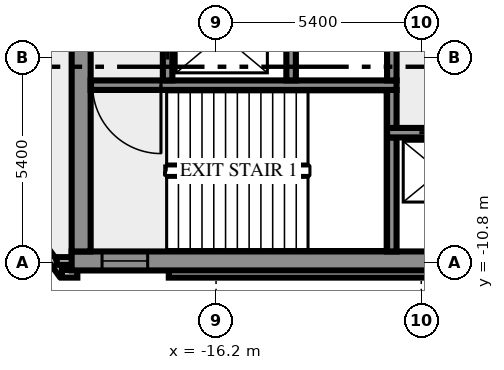
"""IFC4 building model, lengths in metres.
Left out: names, types, materials, properties, quantities, classifications, styles, units other than length and angle.
Written with IfcOpenShell. Run it as: python <this file> out.ifc"""

import sys

from ifc_helpers import new_model, si_unit, direction, frame, frame_2d, origin, place, context, subcontext, project, spatial, rectangle, extrude, element, fill, save


model = new_model("IFC4")
c1 = context("Model", 3, precision=1e-05, world=origin(), true_north=direction((0.0, 1.0)))
c2 = subcontext(c1, "Body", "Model", "MODEL_VIEW")
j1 = project(units=[si_unit("LENGTHUNIT", "METRE"), si_unit("PLANEANGLEUNIT", "RADIAN")], contexts=[c1])
p1 = place(None, origin())
s1 = spatial("IfcSite", under=j1, at=p1, CompositionType="ELEMENT")
p2 = place(p1, origin())
s2 = spatial("IfcBuilding", under=s1, at=p2, CompositionType="ELEMENT")
p3 = place(p2, frame((0.0, 0.0, 121.0)))
s3 = spatial("IfcBuildingStorey", under=s2, at=p3, CompositionType="ELEMENT", Elevation=121.0)
p4 = place(p3, frame((-21.833, -8.909, 0.0), z_axis=(0.0, 0.0, 1.0), x_axis=(0.587766567315, -0.809030569476, 0.0)))
e1 = element("IfcWall", 1, at=p4, inside=s3, PredefinedType="SOLIDWALL", context=c2, shape_type="SweptSolid", body=[
    extrude(rectangle(XDim=2.688, YDim=0.2, at=frame_2d((1.344, 0.0))), origin(), (0.0, 0.0, 1.0), 3.65),
])
p5 = place(p3, frame((-20.256, -11.088, 0.0), z_axis=(0.0, 0.0, 1.0), x_axis=(1.0, 0.0, 0.0)))
e2 = element("IfcWall", 2, at=p5, inside=s3, PredefinedType="SOLIDWALL", context=c2, shape_type="SweptSolid", body=[
    extrude(rectangle(XDim=0.406, YDim=0.2, at=frame_2d((0.203, 0.0))), origin(), (0.0, 0.0, 1.0), 3.65),
])
p6 = place(p3, frame((-17.444, -11.088, 0.0), z_axis=(0.0, 0.0, 1.0), x_axis=(1.0, 0.0, 0.0)))
e3 = element("IfcWall", 3, at=p6, inside=s3, PredefinedType="SOLIDWALL", context=c2, shape_type="SweptSolid", body=[
    extrude(rectangle(XDim=34.888, YDim=0.2, at=frame_2d((17.444, 0.0))), origin(), (0.0, 0.0, 1.0), 3.65),
])
p7 = place(p3, frame((-19.98, -10.75, 0.0), z_axis=(0.0, 0.0, 1.0), x_axis=(-1.0, 0.0, 0.0)))
e4 = element("IfcWall", 4, at=p7, inside=s3, PredefinedType="SOLIDWALL", context=c2, shape_type="SweptSolid", body=[
    extrude(rectangle(XDim=0.417, YDim=0.2, at=frame_2d((0.208, 0.0))), origin(), (0.0, 0.0, 1.0), 3.65),
])
p8 = place(p3, frame((-20.0, -10.75, 0.0), z_axis=(0.0, 0.0, 1.0), x_axis=(1.0, 0.0, 0.0)))
e5 = element("IfcWall", 5, at=p8, inside=s3, PredefinedType="SHEAR", context=c2, shape_type="SweptSolid", body=[
    extrude(rectangle(XDim=40.0, YDim=0.5, at=frame_2d((20.0, 0.0))), origin(), (0.0, 0.0, 1.0), 3.65),
])
p9 = place(p8, frame((0.8, 0.0, 1.0)))
e6 = element("IfcOpeningElement", 6, at=p9, cuts=e5, PredefinedType="OPENING", context=c2, shape_type="SweptSolid", body=[
    extrude(rectangle(XDim=1.2, YDim=1.2, at=frame_2d((0.6, 0.6))), frame((0.0, 0.26, 0.0), z_axis=(0.0, -1.0, 0.0), x_axis=(1.0, 0.0, 0.0)), (0.0, 0.0, 1.0), 0.52),
])
p10 = place(p8, frame((38.0, 0.0, 1.0)))
e7 = element("IfcOpeningElement", 7, at=p10, cuts=e5, PredefinedType="OPENING", context=c2, shape_type="SweptSolid", body=[
    extrude(rectangle(XDim=1.2, YDim=1.2, at=frame_2d((0.6, 0.6))), frame((0.0, 0.26, 0.0), z_axis=(0.0, -1.0, 0.0), x_axis=(1.0, 0.0, 0.0)), (0.0, 0.0, 1.0), 0.52),
])
p11 = place(p3, frame((-19.75, -10.5, 0.0), z_axis=(0.0, 0.0, 1.0), x_axis=(0.0, 1.0, 0.0)))
e8 = element("IfcWall", 8, at=p11, inside=s3, PredefinedType="SHEAR", context=c2, shape_type="SweptSolid", body=[
    extrude(rectangle(XDim=8.8, YDim=0.5, at=frame_2d((4.4, 0.0))), origin(), (0.0, 0.0, 1.0), 3.65),
])
p12 = place(p3, frame((-11.575, -10.5, 0.0), z_axis=(0.0, 0.0, 1.0), x_axis=(0.0, 1.0, 0.0)))
e9 = element("IfcWall", 9, at=p12, inside=s3, PredefinedType="SHEAR", context=c2, shape_type="SweptSolid", body=[
    extrude(rectangle(XDim=3.0, YDim=0.25, at=frame_2d((1.5, 0.0))), origin(), (0.0, 0.0, 1.0), 3.65),
])
p13 = place(p3, frame((11.7, -7.375, 0.0), z_axis=(0.0, 0.0, 1.0), x_axis=(-1.0, 0.0, 0.0)))
e10 = element("IfcWall", 10, at=p13, inside=s3, PredefinedType="SHEAR", context=c2, shape_type="SweptSolid", body=[
    extrude(rectangle(XDim=23.4, YDim=0.25, at=frame_2d((11.7, 0.0))), origin(), (0.0, 0.0, 1.0), 3.65),
])
p14 = place(p13, frame((21.45, 0.0, 0.0)))
e11 = element("IfcOpeningElement", 11, at=p14, cuts=e10, PredefinedType="OPENING", context=c2, shape_type="SweptSolid", body=[
    extrude(rectangle(XDim=1.1, YDim=2.1, at=frame_2d((0.55, 1.05))), frame((0.0, 0.135, 0.0), z_axis=(0.0, -1.0, 0.0), x_axis=(1.0, 0.0, 0.0)), (0.0, 0.0, 1.0), 0.27),
])
p15 = place(p13, frame((18.95, 0.0, 0.0)))
e12 = element("IfcOpeningElement", 12, at=p15, cuts=e10, PredefinedType="OPENING", context=c2, shape_type="SweptSolid", body=[
    extrude(rectangle(XDim=1.1, YDim=2.1, at=frame_2d((0.55, 1.05))), frame((0.0, 0.135, 0.0), z_axis=(0.0, -1.0, 0.0), x_axis=(1.0, 0.0, 0.0)), (0.0, 0.0, 1.0), 0.27),
])
p16 = place(p13, frame((16.45, 0.0, 0.0)))
e13 = element("IfcOpeningElement", 13, at=p16, cuts=e10, PredefinedType="OPENING", context=c2, shape_type="SweptSolid", body=[
    extrude(rectangle(XDim=1.1, YDim=2.1, at=frame_2d((0.55, 1.05))), frame((0.0, 0.135, 0.0), z_axis=(0.0, -1.0, 0.0), x_axis=(1.0, 0.0, 0.0)), (0.0, 0.0, 1.0), 0.27),
])
p17 = place(p13, frame((14.75, 0.0, 0.0)))
e14 = element("IfcOpeningElement", 14, at=p17, cuts=e10, PredefinedType="OPENING", context=c2, shape_type="SweptSolid", body=[
    extrude(rectangle(XDim=0.7, YDim=2.1, at=frame_2d((0.35, 1.05))), frame((0.0, 0.135, 0.0), z_axis=(0.0, -1.0, 0.0), x_axis=(1.0, 0.0, 0.0)), (0.0, 0.0, 1.0), 0.27),
])
p18 = place(p13, frame((13.35, 0.0, 0.0)))
e15 = element("IfcOpeningElement", 15, at=p18, cuts=e10, PredefinedType="OPENING", context=c2, shape_type="SweptSolid", body=[
    extrude(rectangle(XDim=0.9, YDim=2.1, at=frame_2d((0.45, 1.05))), frame((0.0, 0.135, 0.0), z_axis=(0.0, -1.0, 0.0), x_axis=(1.0, 0.0, 0.0)), (0.0, 0.0, 1.0), 0.27),
])
p19 = place(p13, frame((11.975, 0.0, 0.0)))
e16 = element("IfcOpeningElement", 16, at=p19, cuts=e10, PredefinedType="OPENING", context=c2, shape_type="SweptSolid", body=[
    extrude(rectangle(XDim=0.9, YDim=2.1, at=frame_2d((0.45, 1.05))), frame((0.0, 0.135, 0.0), z_axis=(0.0, -1.0, 0.0), x_axis=(1.0, 0.0, 0.0)), (0.0, 0.0, 1.0), 0.27),
])
p20 = place(p13, frame((10.5, 0.0, 0.0)))
e17 = element("IfcOpeningElement", 17, at=p20, cuts=e10, PredefinedType="OPENING", context=c2, shape_type="SweptSolid", body=[
    extrude(rectangle(XDim=0.9, YDim=2.1, at=frame_2d((0.45, 1.05))), frame((0.0, 0.135, 0.0), z_axis=(0.0, -1.0, 0.0), x_axis=(1.0, 0.0, 0.0)), (0.0, 0.0, 1.0), 0.27),
])
p21 = place(p3, frame((-11.575, -7.25, 0.0), z_axis=(0.0, 0.0, 1.0), x_axis=(0.0, 1.0, 0.0)))
e18 = element("IfcWall", 18, at=p21, inside=s3, PredefinedType="SHEAR", context=c2, shape_type="SweptSolid", body=[
    extrude(rectangle(XDim=1.0, YDim=0.25, at=frame_2d((0.5, 0.0))), origin(), (0.0, 0.0, 1.0), 3.65),
])
p22 = place(p3, frame((-11.45, -6.125, 0.0), z_axis=(0.0, 0.0, 1.0), x_axis=(-1.0, 0.0, 0.0)))
e19 = element("IfcWall", 19, at=p22, inside=s3, PredefinedType="SHEAR", context=c2, shape_type="SweptSolid", body=[
    extrude(rectangle(XDim=8.05, YDim=0.25, at=frame_2d((4.025, 0.0))), origin(), (0.0, 0.0, 1.0), 3.65),
])
p23 = place(p22, frame((6.2, 0.0, 0.0)))
e20 = element("IfcOpeningElement", 20, at=p23, cuts=e19, PredefinedType="OPENING", context=c2, shape_type="SweptSolid", body=[
    extrude(rectangle(XDim=1.8, YDim=2.1, at=frame_2d((0.9, 1.05))), frame((0.0, 0.135, 0.0), z_axis=(0.0, -1.0, 0.0), x_axis=(1.0, 0.0, 0.0)), (0.0, 0.0, 1.0), 0.27),
])
p24 = place(p3, frame((-17.475, -6.0, 0.0), z_axis=(0.0, 0.0, 1.0), x_axis=(0.0, 1.0, 0.0)))
e21 = element("IfcWall", 21, at=p24, inside=s3, PredefinedType="SHEAR", context=c2, shape_type="SweptSolid", body=[
    extrude(rectangle(XDim=4.3, YDim=0.25, at=frame_2d((2.15, 0.0))), origin(), (0.0, 0.0, 1.0), 3.65),
])
p25 = place(p24, frame((0.55, 0.0, 0.0)))
e22 = element("IfcOpeningElement", 22, at=p25, cuts=e21, PredefinedType="OPENING", context=c2, shape_type="SweptSolid", body=[
    extrude(rectangle(XDim=1.3, YDim=2.1, at=frame_2d((0.65, 1.05))), frame((0.0, 0.135, 0.0), z_axis=(0.0, -1.0, 0.0), x_axis=(1.0, 0.0, 0.0)), (0.0, 0.0, 1.0), 0.27),
])
for number, where, z_axis, x_axis in (
    (23, (-14.225, -6.0, 0.0), (0.0, 0.0, 1.0), (0.0, 1.0, 0.0)),
    (24, (-11.575, -6.0, 0.0), (0.0, 0.0, 1.0), (0.0, 1.0, 0.0)),
):
    element("IfcWall", number, at=place(p3, frame(where, z_axis=z_axis, x_axis=x_axis)), inside=s3, PredefinedType="SHEAR", context=c2, shape_type="SweptSolid", body=[
        extrude(rectangle(XDim=1.75, YDim=0.25, at=frame_2d((0.875, 0.0))), origin(), (0.0, 0.0, 1.0), 3.65),
    ])
p26 = place(p9, origin())
e25 = element("IfcWindow", 25, at=p26, inside=s3, PartitioningType="SINGLE_PANEL", PredefinedType="WINDOW", context=c2, shape_type="SweptSolid", body=[
    extrude(rectangle(XDim=1.2, YDim=1.2, at=frame_2d((0.6, 0.6))), frame((0.0, 0.03, 0.0), z_axis=(0.0, -1.0, 0.0), x_axis=(1.0, 0.0, 0.0)), (0.0, 0.0, 1.0), 0.06),
])
fill(e6, e25)
p27 = place(p14, origin())
e26 = element("IfcDoor", 26, at=p27, inside=s3, OperationType="DOUBLE_DOOR_SLIDING", PredefinedType="DOOR", context=c2, shape_type="SweptSolid", body=[
    extrude(rectangle(XDim=1.1, YDim=2.1, at=frame_2d((0.55, 1.05))), frame((0.0, 0.025, 0.0), z_axis=(0.0, -1.0, 0.0), x_axis=(1.0, 0.0, 0.0)), (0.0, 0.0, 1.0), 0.05),
])
fill(e11, e26)
p28 = place(p23, origin())
e27 = element("IfcDoor", 27, at=p28, inside=s3, OperationType="DOUBLE_DOOR_SINGLE_SWING", PredefinedType="DOOR", context=c2, shape_type="SweptSolid", body=[
    extrude(rectangle(XDim=1.8, YDim=2.1, at=frame_2d((0.9, 1.05))), frame((0.0, 0.025, 0.0), z_axis=(0.0, -1.0, 0.0), x_axis=(1.0, 0.0, 0.0)), (0.0, 0.0, 1.0), 0.05),
])
fill(e20, e27)
p29 = place(p25, origin())
e28 = element("IfcDoor", 28, at=p29, inside=s3, OperationType="DOUBLE_DOOR_SLIDING", PredefinedType="DOOR", context=c2, shape_type="SweptSolid", body=[
    extrude(rectangle(XDim=1.3, YDim=2.1, at=frame_2d((0.65, 1.05))), frame((0.0, 0.025, 0.0), z_axis=(0.0, -1.0, 0.0), x_axis=(1.0, 0.0, 0.0)), (0.0, 0.0, 1.0), 0.05),
])
fill(e22, e28)
save(model, sys.argv[1])
